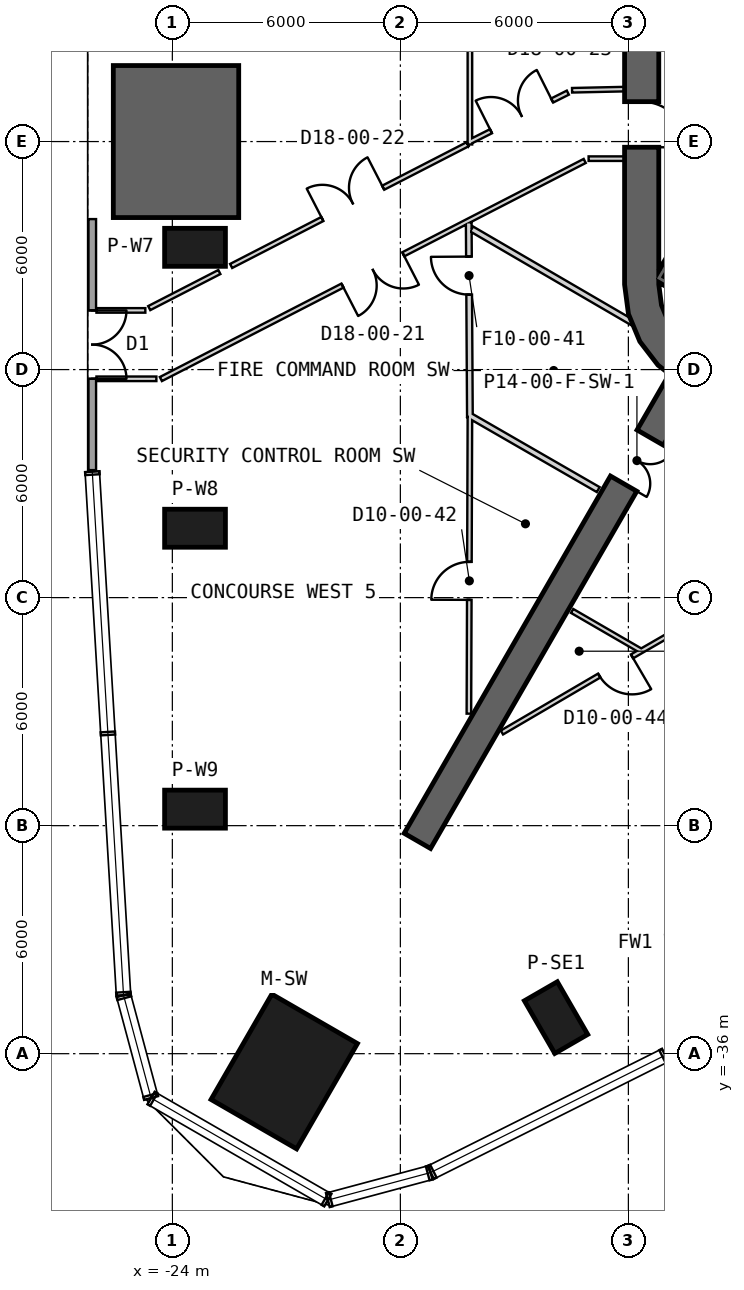
"""IFC4 building model, lengths in metres.
Left out: names, types, materials, properties, quantities, classifications, styles, units other than length and angle.
Written with IfcOpenShell. Run it as: python <this file> out.ifc"""

import sys

from ifc_helpers import new_model, si_unit, direction, frame, frame_2d, origin, origin_2d, place, context, subcontext, project, spatial, polyline, rectangle, outline, extrude, element, fill, save


model = new_model("IFC4")
c1 = context("Model", 3, precision=1e-05, world=origin(), true_north=direction((0.0, 1.0)))
c2 = subcontext(c1, "Body", "Model", "MODEL_VIEW")
j1 = project(units=[si_unit("LENGTHUNIT", "METRE"), si_unit("PLANEANGLEUNIT", "RADIAN")], contexts=[c1])
p1 = place(None, origin())
s1 = spatial("IfcSite", under=j1, at=p1, CompositionType="ELEMENT")
p2 = place(p1, origin())
s2 = spatial("IfcBuilding", under=s1, at=p2, CompositionType="ELEMENT")
p3 = place(p2, origin())
s3 = spatial("IfcBuildingStorey", under=s2, at=p3, CompositionType="ELEMENT", Elevation=0.0)
p4 = place(p3, frame((-21.056, -36.469, 0.0), z_axis=(0.0, 0.0, 1.0), x_axis=(-0.5, -0.866025403784, 0.0)))
e1 = element("IfcColumn", 1, at=p4, inside=s3, PredefinedType="COLUMN", context=c2, shape_type="SweptSolid", body=[
    extrude(rectangle(XDim=3.2, YDim=2.6, at=origin_2d()), origin(), (0.0, 0.0, 1.0), 9.0),
])
for number, where, z_axis, x_axis in (
    (2, (-23.403, -14.783, 0.0), (0.0, 0.0, 1.0), (-1.0, 0.0, 0.0)),
    (3, (-23.403, -22.174, 0.0), (0.0, 0.0, 1.0), (-1.0, 0.0, 0.0)),
    (4, (-23.403, -29.566, 0.0), (0.0, 0.0, 1.0), (-1.0, 0.0, 0.0)),
    (5, (-13.903, -35.051, 0.0), (0.0, 0.0, 1.0), (0.5, -0.866, 0.0)),
):
    element("IfcColumn", number, at=place(p3, frame(where, z_axis=z_axis, x_axis=x_axis)), inside=s3, PredefinedType="COLUMN", context=c2, shape_type="SweptSolid", body=[
        extrude(rectangle(XDim=1.6, YDim=1.0, at=origin_2d()), origin(), (0.0, 0.0, 1.0), 9.0),
    ])
p5 = place(p3, frame((-11.65, 15.762, 0.0), z_axis=(0.0, 0.0, 1.0), x_axis=(0.0, -1.0, 0.0)))
e6 = element("IfcWall", 6, at=p5, inside=s3, PredefinedType="SHEAR", context=c2, shape_type="SweptSolid", body=[
    extrude(rectangle(XDim=31.523, YDim=0.9, at=frame_2d((15.762, 0.0))), origin(), (0.0, 0.0, 1.0), 9.0),
])
p6 = place(p5, frame((7.062, 0.0, 0.0)))
e7 = element("IfcOpeningElement", 7, at=p6, cuts=e6, PredefinedType="OPENING", context=c2, shape_type="SweptSolid", body=[
    extrude(rectangle(XDim=1.2, YDim=2.4, at=frame_2d((0.6, 1.2))), frame((0.0, 0.46, 0.0), z_axis=(0.0, -1.0, 0.0), x_axis=(1.0, 0.0, 0.0)), (0.0, 0.0, 1.0), 0.92),
])
p7 = place(p5, frame((9.762, 0.0, 0.0)))
e8 = element("IfcOpeningElement", 8, at=p7, cuts=e6, PredefinedType="OPENING", context=c2, shape_type="SweptSolid", body=[
    extrude(rectangle(XDim=1.2, YDim=2.4, at=frame_2d((0.6, 1.2))), frame((0.0, 0.46, 0.0), z_axis=(0.0, -1.0, 0.0), x_axis=(1.0, 0.0, 0.0)), (0.0, 0.0, 1.0), 0.92),
])
p8 = place(p5, frame((12.462, 0.0, 0.0)))
e9 = element("IfcOpeningElement", 9, at=p8, cuts=e6, PredefinedType="OPENING", context=c2, shape_type="SweptSolid", body=[
    extrude(rectangle(XDim=1.2, YDim=2.4, at=frame_2d((0.6, 1.2))), frame((0.0, 0.46, 0.0), z_axis=(0.0, -1.0, 0.0), x_axis=(1.0, 0.0, 0.0)), (0.0, 0.0, 1.0), 0.92),
])
p9 = place(p5, frame((15.162, 0.0, 0.0)))
e10 = element("IfcOpeningElement", 10, at=p9, cuts=e6, PredefinedType="OPENING", context=c2, shape_type="SweptSolid", body=[
    extrude(rectangle(XDim=1.2, YDim=2.4, at=frame_2d((0.6, 1.2))), frame((0.0, 0.46, 0.0), z_axis=(0.0, -1.0, 0.0), x_axis=(1.0, 0.0, 0.0)), (0.0, 0.0, 1.0), 0.92),
])
p10 = place(p5, frame((17.862, 0.0, 0.0)))
e11 = element("IfcOpeningElement", 11, at=p10, cuts=e6, PredefinedType="OPENING", context=c2, shape_type="SweptSolid", body=[
    extrude(rectangle(XDim=1.2, YDim=2.4, at=frame_2d((0.6, 1.2))), frame((0.0, 0.46, 0.0), z_axis=(0.0, -1.0, 0.0), x_axis=(1.0, 0.0, 0.0)), (0.0, 0.0, 1.0), 0.92),
])
p11 = place(p5, frame((20.562, 0.0, 0.0)))
e12 = element("IfcOpeningElement", 12, at=p11, cuts=e6, PredefinedType="OPENING", context=c2, shape_type="SweptSolid", body=[
    extrude(rectangle(XDim=1.2, YDim=2.4, at=frame_2d((0.6, 1.2))), frame((0.0, 0.46, 0.0), z_axis=(0.0, -1.0, 0.0), x_axis=(1.0, 0.0, 0.0)), (0.0, 0.0, 1.0), 0.92),
])
p12 = place(p5, frame((23.262, 0.0, 0.0)))
e13 = element("IfcOpeningElement", 13, at=p12, cuts=e6, PredefinedType="OPENING", context=c2, shape_type="SweptSolid", body=[
    extrude(rectangle(XDim=1.2, YDim=2.4, at=frame_2d((0.6, 1.2))), frame((0.0, 0.46, 0.0), z_axis=(0.0, -1.0, 0.0), x_axis=(1.0, 0.0, 0.0)), (0.0, 0.0, 1.0), 0.92),
])
p13 = place(p5, frame((3.612, 0.0, 0.0)))
e14 = element("IfcOpeningElement", 14, at=p13, cuts=e6, PredefinedType="OPENING", context=c2, shape_type="SweptSolid", body=[
    extrude(rectangle(XDim=1.2, YDim=2.4, at=frame_2d((0.6, 1.2))), frame((0.0, 0.46, 0.0), z_axis=(0.0, -1.0, 0.0), x_axis=(1.0, 0.0, 0.0)), (0.0, 0.0, 1.0), 0.92),
])
p14 = place(p5, frame((26.712, 0.0, 0.0)))
e15 = element("IfcOpeningElement", 15, at=p14, cuts=e6, PredefinedType="OPENING", context=c2, shape_type="SweptSolid", body=[
    extrude(rectangle(XDim=1.2, YDim=2.4, at=frame_2d((0.6, 1.2))), frame((0.0, 0.46, 0.0), z_axis=(0.0, -1.0, 0.0), x_axis=(1.0, 0.0, 0.0)), (0.0, 0.0, 1.0), 0.92),
])
p15 = place(p3, origin())
e16 = element("IfcWall", 16, at=p15, inside=s3, PredefinedType="SHEAR", context=c2, shape_type="SweptSolid", body=[
    extrude(outline(polyline([(-12.1, -15.762), (-11.998, -16.538), (-11.698, -17.262), (-11.221, -17.883), (-10.6, -18.36), (-9.876, -18.659), (-9.1, -18.762), (-8.323, -18.659), (-7.6, -18.36), (-8.05, -17.58), (-8.556, -17.79), (-9.1, -17.862), (-9.644, -17.79), (-10.15, -17.58), (-10.585, -17.247), (-10.919, -16.812), (-11.128, -16.305), (-11.2, -15.762), (-12.1, -15.762)])), origin(), (0.0, 0.0, 1.0), 9.0),
])
p16 = place(p3, frame((-10.575, -18.316, 0.0), z_axis=(0.0, 0.0, 1.0), x_axis=(-0.499996575515, -0.866027380903, 0.0)))
e17 = element("IfcWall", 17, at=p16, inside=s3, PredefinedType="SHEAR", context=c2, shape_type="SweptSolid", body=[
    extrude(rectangle(XDim=13.954, YDim=0.8, at=frame_2d((6.977, 0.0))), origin(), (0.0, 0.0, 1.0), 9.0),
])
p17 = place(p16, frame((1.7, 0.0, 0.0)))
e18 = element("IfcOpeningElement", 18, at=p17, cuts=e17, PredefinedType="OPENING", context=c2, shape_type="SweptSolid", body=[
    extrude(rectangle(XDim=1.4, YDim=2.4, at=frame_2d((0.7, 1.2))), frame((0.0, 0.41, 0.0), z_axis=(0.0, -1.0, 0.0), x_axis=(1.0, 0.0, 0.0)), (0.0, 0.0, 1.0), 0.82),
])
p18 = place(p3, origin())
e19 = element("IfcWall", 19, at=p18, inside=s3, PredefinedType="SHEAR", context=c2, shape_type="SweptSolid", body=[
    extrude(outline(polyline([(-25.553, -10.0), (-25.553, -14.0), (-22.253, -14.0), (-22.253, -10.0), (-25.553, -10.0)])), origin(), (0.0, 0.0, 1.0), 9.0),
])
p19 = place(p3, frame((-26.107, -14.04, 0.0), z_axis=(0.0, 0.0, 1.0), x_axis=(7.3923489e-05, -0.999999997268, 0.0)))
e20 = element("IfcWall", 20, at=p19, inside=s3, PredefinedType="SOLIDWALL", context=c2, shape_type="SweptSolid", body=[
    extrude(rectangle(XDim=6.605, YDim=0.2, at=frame_2d((3.303, 0.0))), origin(), (0.0, 0.0, 1.0), 8.7),
])
p20 = place(p19, frame((2.403, 0.0, 0.0)))
e21 = element("IfcOpeningElement", 21, at=p20, cuts=e20, PredefinedType="OPENING", context=c2, shape_type="SweptSolid", body=[
    extrude(rectangle(XDim=1.8, YDim=2.4, at=frame_2d((0.9, 1.2))), frame((0.0, 0.11, 0.0), z_axis=(0.0, -1.0, 0.0), x_axis=(1.0, 0.0, 0.0)), (0.0, 0.0, 1.0), 0.22),
])
p21 = place(p3, frame((-11.031, -36.041, 0.0), z_axis=(0.0, 0.0, 1.0), x_axis=(0.894384485348, 0.447298996611, 0.0)))
e22 = element("IfcWall", 22, at=p21, inside=s3, PredefinedType="SOLIDWALL", context=c2, shape_type="SweptSolid", body=[
    extrude(rectangle(XDim=6.861, YDim=0.2, at=frame_2d((3.43, 0.0))), origin(), (0.0, 0.0, 1.0), 8.7),
])
p22 = place(p21, frame((0.74, 0.0, 0.0)))
e23 = element("IfcOpeningElement", 23, at=p22, cuts=e22, PredefinedType="OPENING", context=c2, shape_type="SweptSolid", body=[
    extrude(rectangle(XDim=1.8, YDim=2.4, at=frame_2d((0.9, 1.2))), frame((0.0, 0.11, 0.0), z_axis=(0.0, -1.0, 0.0), x_axis=(1.0, 0.0, 0.0)), (0.0, 0.0, 1.0), 0.22),
])
p23 = place(p3, frame((-11.282, -15.541, -0.4), z_axis=(0.0, 0.0, 1.0), x_axis=(0.866000483506, -0.500043160704, 0.0)))
e24 = element("IfcWall", 24, at=p23, inside=s3, PredefinedType="SHEAR", context=c2, shape_type="SweptSolid", body=[
    extrude(rectangle(XDim=3.8, YDim=0.2, at=frame_2d((1.9, 0.0))), origin(), (0.0, 0.0, 1.0), 9.1),
])
p24 = place(p3, frame((-7.196, -8.663, -0.4), z_axis=(0.0, 0.0, 1.0), x_axis=(-0.499997992926, -0.866026562566, 0.0)))
e25 = element("IfcWall", 25, at=p24, inside=s3, PredefinedType="SHEAR", context=c2, shape_type="SweptSolid", body=[
    extrude(rectangle(XDim=7.9, YDim=0.2, at=frame_2d((3.95, 0.0))), origin(), (0.0, 0.0, 1.0), 9.1),
])
p25 = place(p3, frame((-13.481, -10.65, 0.0), z_axis=(0.0, 0.0, 1.0), x_axis=(0.999759933767, 0.021910610072, 0.0)))
e26 = element("IfcWall", 26, at=p25, inside=s3, PredefinedType="PARTITIONING", context=c2, shape_type="SweptSolid", body=[
    extrude(rectangle(XDim=1.382, YDim=0.12, at=frame_2d((0.691, 0.0))), origin(), (0.0, 0.0, 1.0), 8.7),
])
p26 = place(p3, frame((-16.2, -12.022, 0.0), z_axis=(0.0, 0.0, 1.0), x_axis=(0.893622341214, 0.448819686826, 0.0)))
e27 = element("IfcWall", 27, at=p26, inside=s3, PredefinedType="PARTITIONING", context=c2, shape_type="SweptSolid", body=[
    extrude(rectangle(XDim=2.917, YDim=0.12, at=frame_2d((1.458, 0.0))), origin(), (0.0, 0.0, 1.0), 8.7),
])
p27 = place(p26, frame((0.655, 0.0, 0.0)))
e28 = element("IfcOpeningElement", 28, at=p27, cuts=e27, PredefinedType="OPENING", context=c2, shape_type="SweptSolid", body=[
    extrude(rectangle(XDim=1.8, YDim=2.1, at=frame_2d((0.9, 1.05))), frame((0.0, 0.07, 0.0), z_axis=(0.0, -1.0, 0.0), x_axis=(1.0, 0.0, 0.0)), (0.0, 0.0, 1.0), 0.14),
])
p28 = place(p3, frame((-16.17, 14.273, 0.0), z_axis=(0.0, 0.0, 1.0), x_axis=(0.0, -1.0, 0.0)))
e29 = element("IfcWall", 29, at=p28, inside=s3, PredefinedType="PARTITIONING", context=c2, shape_type="SweptSolid", body=[
    extrude(rectangle(XDim=26.35, YDim=0.12, at=frame_2d((13.175, 0.0))), origin(), (0.0, 0.0, 1.0), 8.08),
])
p29 = place(p28, frame((19.314, 0.0, 0.0)))
e30 = element("IfcOpeningElement", 30, at=p29, cuts=e29, PredefinedType="OPENING", context=c2, shape_type="SweptSolid", body=[
    extrude(rectangle(XDim=1.8, YDim=2.1, at=frame_2d((0.9, 1.05))), frame((0.0, 0.07, 0.0), z_axis=(0.0, -1.0, 0.0), x_axis=(1.0, 0.0, 0.0)), (0.0, 0.0, 1.0), 0.14),
])
p30 = place(p28, frame((12.314, 0.0, 0.0)))
e31 = element("IfcOpeningElement", 31, at=p30, cuts=e29, PredefinedType="OPENING", context=c2, shape_type="SweptSolid", body=[
    extrude(rectangle(XDim=1.8, YDim=2.1, at=frame_2d((0.9, 1.05))), frame((0.0, 0.07, 0.0), z_axis=(0.0, -1.0, 0.0), x_axis=(1.0, 0.0, 0.0)), (0.0, 0.0, 1.0), 0.14),
])
p31 = place(p28, frame((5.314, 0.0, 0.0)))
e32 = element("IfcOpeningElement", 32, at=p31, cuts=e29, PredefinedType="OPENING", context=c2, shape_type="SweptSolid", body=[
    extrude(rectangle(XDim=1.8, YDim=2.1, at=frame_2d((0.9, 1.05))), frame((0.0, 0.07, 0.0), z_axis=(0.0, -1.0, 0.0), x_axis=(1.0, 0.0, 0.0)), (0.0, 0.0, 1.0), 0.14),
])
p32 = place(p3, frame((-4.276, -21.14, 0.0), z_axis=(0.0, 0.0, 1.0), x_axis=(-0.866020735843, -0.500008085025, 0.0)))
e33 = element("IfcWall", 33, at=p32, inside=s3, PredefinedType="PARTITIONING", context=c2, shape_type="SweptSolid", body=[
    extrude(rectangle(XDim=8.558, YDim=0.12, at=frame_2d((4.279, 0.0))), origin(), (0.0, 0.0, 1.0), 7.78),
])
p33 = place(p3, frame((-16.197, -27.053, 0.0), z_axis=(0.0, 0.0, 1.0), x_axis=(0.003407082, 0.999994195879, 0.0)))
e34 = element("IfcWall", 34, at=p33, inside=s3, PredefinedType="PARTITIONING", context=c2, shape_type="SweptSolid", body=[
    extrude(rectangle(XDim=7.811, YDim=0.12, at=frame_2d((3.905, 0.0))), origin(), (0.0, 0.0, 1.0), 7.78),
])
p34 = place(p33, frame((2.994, 0.0, 0.0)))
e35 = element("IfcOpeningElement", 35, at=p34, cuts=e34, PredefinedType="OPENING", context=c2, shape_type="SweptSolid", body=[
    extrude(rectangle(XDim=1.0, YDim=2.1, at=frame_2d((0.5, 1.05))), frame((0.0, 0.07, 0.0), z_axis=(0.0, -1.0, 0.0), x_axis=(1.0, 0.0, 0.0)), (0.0, 0.0, 1.0), 0.14),
])
p35 = place(p3, frame((-16.2, -19.195, 0.0), z_axis=(0.0, 0.0, 1.0), x_axis=(0.866480040483, -0.499211718057, 0.0)))
e36 = element("IfcWall", 36, at=p35, inside=s3, PredefinedType="PLUMBINGWALL", context=c2, shape_type="SweptSolid", body=[
    extrude(rectangle(XDim=3.932, YDim=0.15, at=frame_2d((1.966, 0.0))), origin(), (0.0, 0.0, 1.0), 7.78),
])
p36 = place(p3, frame((-16.17, -19.243, 0.0), z_axis=(0.0, 0.0, 1.0), x_axis=(-0.006010481517, 0.999981936893, 0.0)))
e37 = element("IfcWall", 37, at=p36, inside=s3, PredefinedType="PLUMBINGWALL", context=c2, shape_type="SweptSolid", body=[
    extrude(rectangle(XDim=5.118, YDim=0.15, at=frame_2d((2.559, 0.0))), origin(), (0.0, 0.0, 1.0), 7.88),
])
p37 = place(p36, frame((3.216, 0.0, 0.0)))
e38 = element("IfcOpeningElement", 38, at=p37, cuts=e37, PredefinedType="OPENING", context=c2, shape_type="SweptSolid", body=[
    extrude(rectangle(XDim=1.0, YDim=2.1, at=frame_2d((0.5, 1.05))), frame((0.0, 0.085, 0.0), z_axis=(0.0, -1.0, 0.0), x_axis=(1.0, 0.0, 0.0)), (0.0, 0.0, 1.0), 0.17),
])
p38 = place(p3, frame((-11.729, -16.86, 0.0), z_axis=(0.0, 0.0, 1.0), x_axis=(-0.864161643102, 0.503214322721, 0.0)))
e39 = element("IfcWall", 39, at=p38, inside=s3, PredefinedType="PLUMBINGWALL", context=c2, shape_type="SweptSolid", body=[
    extrude(rectangle(XDim=5.086, YDim=0.15, at=frame_2d((2.543, 0.0))), origin(), (0.0, 0.0, 1.0), 7.78),
])
p39 = place(p3, frame((-13.481, -24.35, 0.0), z_axis=(0.0, 0.0, 1.0), x_axis=(0.865282890553, -0.501283870992, 0.0)))
e40 = element("IfcWall", 40, at=p39, inside=s3, PredefinedType="PARTITIONING", context=c2, shape_type="SweptSolid", body=[
    extrude(rectangle(XDim=2.138, YDim=0.12, at=frame_2d((1.069, 0.0))), origin(), (0.0, 0.0, 1.0), 8.7),
])
p40 = place(p3, frame((-11.688, -25.419, 0.0), z_axis=(0.0, 0.0, 1.0), x_axis=(-0.863165231754, -0.50492156093, 0.0)))
e41 = element("IfcWall", 41, at=p40, inside=s3, PredefinedType="PARTITIONING", context=c2, shape_type="SweptSolid", body=[
    extrude(rectangle(XDim=4.218, YDim=0.12, at=frame_2d((2.109, 0.0))), origin(), (0.0, 0.0, 1.0), 8.7),
])
p41 = place(p40, frame((0.25, 0.0, 0.0)))
e42 = element("IfcOpeningElement", 42, at=p41, cuts=e41, PredefinedType="OPENING", context=c2, shape_type="SweptSolid", body=[
    extrude(rectangle(XDim=1.0, YDim=2.1, at=frame_2d((0.5, 1.05))), frame((0.0, 0.07, 0.0), z_axis=(0.0, -1.0, 0.0), x_axis=(1.0, 0.0, 0.0)), (0.0, 0.0, 1.0), 0.14),
])
p42 = place(p3, frame((-26.007, -16.443, 0.0), z_axis=(0.0, 0.0, 1.0), x_axis=(1.0, 0.0, 0.0)))
e43 = element("IfcWall", 43, at=p42, inside=s3, PredefinedType="PARTITIONING", context=c2, shape_type="SweptSolid", body=[
    extrude(rectangle(XDim=1.297, YDim=0.12, at=frame_2d((0.648, 0.0))), origin(), (0.0, 0.0, 1.0), 8.7),
])
p43 = place(p3, frame((-16.23, -12.071, 0.0), z_axis=(0.0, 0.0, 1.0), x_axis=(-0.889183605382, -0.457550561053, 0.0)))
e44 = element("IfcWall", 44, at=p43, inside=s3, PredefinedType="PARTITIONING", context=c2, shape_type="SweptSolid", body=[
    extrude(rectangle(XDim=6.999, YDim=0.12, at=frame_2d((3.5, 0.0))), origin(), (0.0, 0.0, 1.0), 8.7),
])
p44 = place(p43, frame((2.499, 0.0, 0.0)))
e45 = element("IfcOpeningElement", 45, at=p44, cuts=e44, PredefinedType="OPENING", context=c2, shape_type="SweptSolid", body=[
    extrude(rectangle(XDim=1.8, YDim=2.1, at=frame_2d((0.9, 1.05))), frame((0.0, 0.07, 0.0), z_axis=(0.0, -1.0, 0.0), x_axis=(1.0, 0.0, 0.0)), (0.0, 0.0, 1.0), 0.14),
])
p45 = place(p3, frame((-22.763, -15.433, 0.0), z_axis=(0.0, 0.0, 1.0), x_axis=(-0.88919210908, -0.457534034963, 0.0)))
e46 = element("IfcWall", 46, at=p45, inside=s3, PredefinedType="PARTITIONING", context=c2, shape_type="SweptSolid", body=[
    extrude(rectangle(XDim=2.076, YDim=0.12, at=frame_2d((1.038, 0.0))), origin(), (0.0, 0.0, 1.0), 8.7),
])
p46 = place(p3, frame((-12.07, -12.45, 0.0), z_axis=(0.0, 0.0, 1.0), x_axis=(-1.0, 0.0, 0.0)))
e47 = element("IfcWall", 47, at=p46, inside=s3, PredefinedType="PARTITIONING", context=c2, shape_type="SweptSolid", body=[
    extrude(rectangle(XDim=0.977, YDim=0.12, at=frame_2d((0.488, 0.0))), origin(), (0.0, 0.0, 1.0), 7.88),
])
p47 = place(p3, frame((-24.302, -18.249, 0.0), z_axis=(0.0, 0.0, 1.0), x_axis=(0.889186002608, 0.45754590236, 0.0)))
e48 = element("IfcWall", 48, at=p47, inside=s3, PredefinedType="PARTITIONING", context=c2, shape_type="SweptSolid", body=[
    extrude(rectangle(XDim=12.543, YDim=0.12, at=frame_2d((6.272, 0.0))), origin(), (0.0, 0.0, 1.0), 7.88),
])
p48 = place(p47, frame((5.375, 0.0, 0.0)))
e49 = element("IfcOpeningElement", 49, at=p48, cuts=e48, PredefinedType="OPENING", context=c2, shape_type="SweptSolid", body=[
    extrude(rectangle(XDim=1.8, YDim=2.1, at=frame_2d((0.9, 1.05))), frame((0.0, 0.07, 0.0), z_axis=(0.0, -1.0, 0.0), x_axis=(1.0, 0.0, 0.0)), (0.0, 0.0, 1.0), 0.14),
])
p49 = place(p3, frame((-26.007, -18.243, 0.0), z_axis=(0.0, 0.0, 1.0), x_axis=(0.999999988162, 0.000153869824, 0.0)))
e50 = element("IfcWall", 50, at=p49, inside=s3, PredefinedType="PARTITIONING", context=c2, shape_type="SweptSolid", body=[
    extrude(rectangle(XDim=1.587, YDim=0.12, at=frame_2d((0.793, 0.0))), origin(), (0.0, 0.0, 1.0), 8.7),
])
p50 = place(p20, frame((1.8, 0.0, 0.0), z_axis=(0.0, 0.0, 1.0), x_axis=(-1.0, 0.0, 0.0)))
e51 = element("IfcDoor", 51, at=p50, inside=s3, OperationType="SINGLE_SWING_RIGHT", PredefinedType="DOOR", context=c2, shape_type="SweptSolid", body=[
    extrude(rectangle(XDim=1.8, YDim=2.4, at=frame_2d((0.9, 1.2))), frame((0.0, 0.025, 0.0), z_axis=(0.0, -1.0, 0.0), x_axis=(1.0, 0.0, 0.0)), (0.0, 0.0, 1.0), 0.05),
])
fill(e21, e51)
p51 = place(p48, origin())
e52 = element("IfcDoor", 52, at=p51, inside=s3, OperationType="DOUBLE_DOOR_SINGLE_SWING", PredefinedType="NOTDEFINED", context=c2, shape_type="SweptSolid", body=[
    extrude(rectangle(XDim=1.8, YDim=2.1, at=frame_2d((0.9, 1.05))), frame((0.0, 0.025, 0.0), z_axis=(0.0, -1.0, 0.0), x_axis=(1.0, 0.0, 0.0)), (0.0, 0.0, 1.0), 0.05),
])
fill(e49, e52)
p52 = place(p44, origin())
e53 = element("IfcDoor", 53, at=p52, inside=s3, OperationType="DOUBLE_DOOR_SINGLE_SWING", PredefinedType="NOTDEFINED", context=c2, shape_type="SweptSolid", body=[
    extrude(rectangle(XDim=1.8, YDim=2.1, at=frame_2d((0.9, 1.05))), frame((0.0, 0.025, 0.0), z_axis=(0.0, -1.0, 0.0), x_axis=(1.0, 0.0, 0.0)), (0.0, 0.0, 1.0), 0.05),
])
fill(e45, e53)
p53 = place(p27, origin())
e54 = element("IfcDoor", 54, at=p53, inside=s3, OperationType="DOUBLE_DOOR_SINGLE_SWING", PredefinedType="NOTDEFINED", context=c2, shape_type="SweptSolid", body=[
    extrude(rectangle(XDim=1.8, YDim=2.1, at=frame_2d((0.9, 1.05))), frame((0.0, 0.025, 0.0), z_axis=(0.0, -1.0, 0.0), x_axis=(1.0, 0.0, 0.0)), (0.0, 0.0, 1.0), 0.05),
])
fill(e28, e54)
p54 = place(p37, origin())
e55 = element("IfcDoor", 55, at=p54, inside=s3, OperationType="SINGLE_SWING_RIGHT", PredefinedType="USERDEFINED", context=c2, shape_type="SweptSolid", body=[
    extrude(rectangle(XDim=1.0, YDim=2.1, at=frame_2d((0.5, 1.05))), frame((0.0, 0.025, 0.0), z_axis=(0.0, -1.0, 0.0), x_axis=(1.0, 0.0, 0.0)), (0.0, 0.0, 1.0), 0.05),
])
fill(e38, e55)
p55 = place(p34, origin())
e56 = element("IfcDoor", 56, at=p55, inside=s3, OperationType="SINGLE_SWING_LEFT", PredefinedType="NOTDEFINED", context=c2, shape_type="SweptSolid", body=[
    extrude(rectangle(XDim=1.0, YDim=2.1, at=frame_2d((0.5, 1.05))), frame((0.0, 0.025, 0.0), z_axis=(0.0, -1.0, 0.0), x_axis=(1.0, 0.0, 0.0)), (0.0, 0.0, 1.0), 0.05),
])
fill(e35, e56)
p56 = place(p41, origin())
e57 = element("IfcDoor", 57, at=p56, inside=s3, OperationType="SINGLE_SWING_LEFT", PredefinedType="NOTDEFINED", context=c2, shape_type="SweptSolid", body=[
    extrude(rectangle(XDim=1.0, YDim=2.1, at=frame_2d((0.5, 1.05))), frame((0.0, 0.025, 0.0), z_axis=(0.0, -1.0, 0.0), x_axis=(1.0, 0.0, 0.0)), (0.0, 0.0, 1.0), 0.05),
])
fill(e42, e57)
p57 = place(p14, origin())
e58 = element("IfcDoor", 58, at=p57, inside=s3, OperationType="SINGLE_SWING_RIGHT", PredefinedType="USERDEFINED", context=c2, shape_type="SweptSolid", body=[
    extrude(rectangle(XDim=1.2, YDim=2.4, at=frame_2d((0.6, 1.2))), frame((0.0, 0.025, 0.0), z_axis=(0.0, -1.0, 0.0), x_axis=(1.0, 0.0, 0.0)), (0.0, 0.0, 1.0), 0.05),
])
fill(e15, e58)
p58 = place(p17, origin())
e59 = element("IfcDoor", 59, at=p58, inside=s3, OperationType="DOUBLE_DOOR_SINGLE_SWING", PredefinedType="NOTDEFINED", context=c2, shape_type="SweptSolid", body=[
    extrude(rectangle(XDim=1.4, YDim=2.4, at=frame_2d((0.7, 1.2))), frame((0.0, 0.025, 0.0), z_axis=(0.0, -1.0, 0.0), x_axis=(1.0, 0.0, 0.0)), (0.0, 0.0, 1.0), 0.05),
])
fill(e18, e59)
save(model, sys.argv[1])
